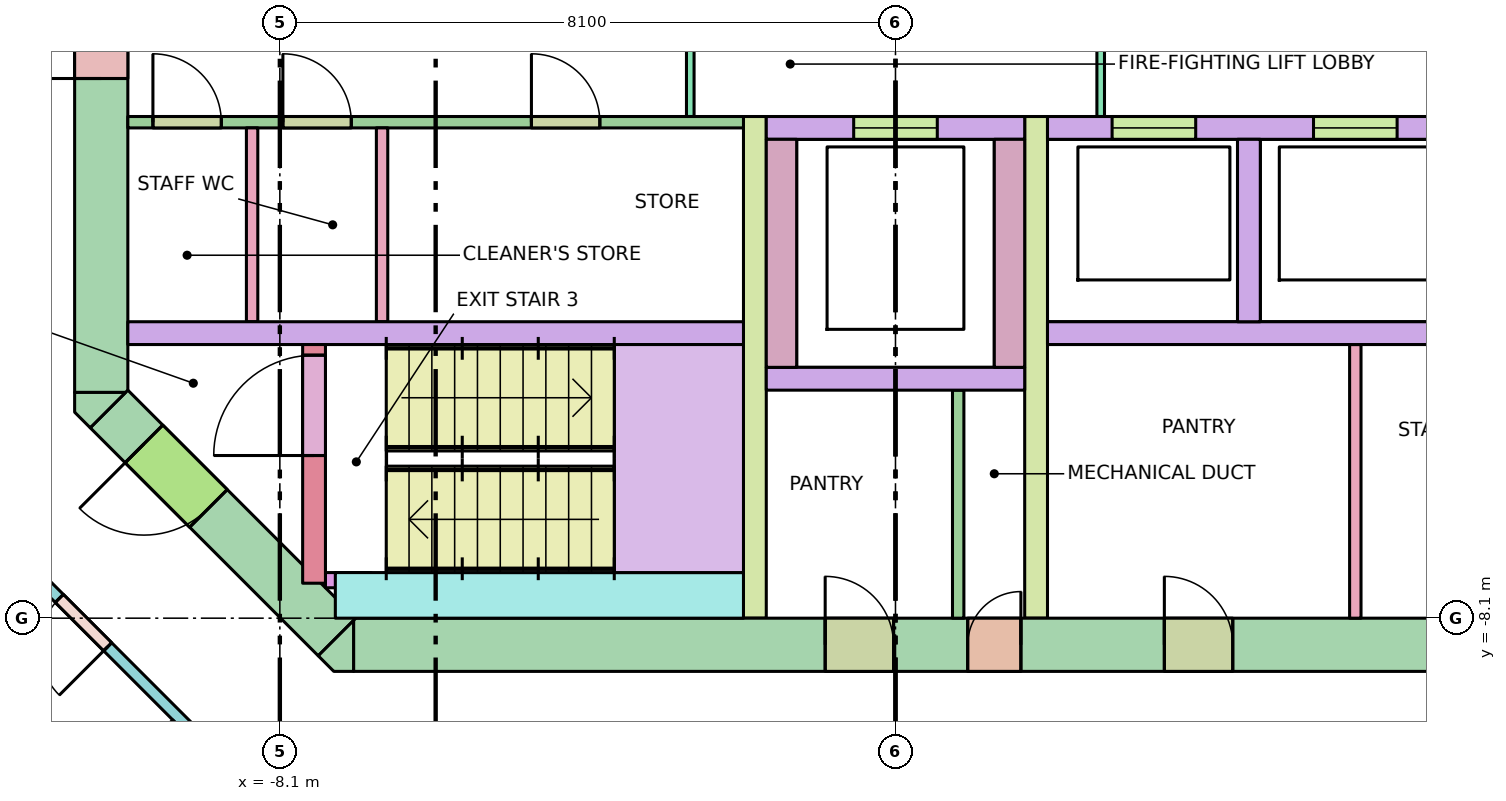
"""IFC4 building model, lengths in metres.
Left out: names, types, materials, properties, quantities, classifications, styles, units other than length and angle.
Written with IfcOpenShell. Run it as: python <this file> out.ifc"""

import sys

from ifc_helpers import new_model, si_unit, direction, frame, frame_2d, origin, place, context, subcontext, project, spatial, polyline, rectangle, outline, extrude, element, fill, save


model = new_model("IFC4")
c1 = context("Model", 3, precision=1e-05, world=origin(), true_north=direction((0.0, 1.0)))
c2 = subcontext(c1, "Body", "Model", "MODEL_VIEW")
j1 = project(units=[si_unit("LENGTHUNIT", "METRE"), si_unit("PLANEANGLEUNIT", "RADIAN")], contexts=[c1])
p1 = place(None, origin())
s1 = spatial("IfcSite", under=j1, at=p1, CompositionType="ELEMENT")
p2 = place(p1, origin())
s2 = spatial("IfcBuilding", under=s1, at=p2, CompositionType="ELEMENT")
p3 = place(p2, frame((0.0, 0.0, 154.2)))
s3 = spatial("IfcBuildingStorey", under=s2, at=p3, CompositionType="ELEMENT", Elevation=154.2)
p4 = place(p3, frame((-7.13, -8.45, -0.28), z_axis=(0.0, 0.0, 1.0), x_axis=(1.0, 0.0, 0.0)))
e1 = element("IfcWall", 1, at=p4, inside=s3, PredefinedType="SHEAR", context=c2, shape_type="SweptSolid", body=[
    extrude(rectangle(XDim=14.26, YDim=0.7, at=frame_2d((7.13, 0.0))), origin(), (0.0, 0.0, 1.0), 3.7),
])
p5 = place(p4, frame((8.08, 0.0, 0.28)))
e2 = element("IfcOpeningElement", 2, at=p5, cuts=e1, PredefinedType="OPENING", context=c2, shape_type="SweptSolid", body=[
    extrude(rectangle(XDim=0.7, YDim=2.1, at=frame_2d((0.35, 1.05))), frame((0.0, 0.36, 0.0), z_axis=(0.0, -1.0, 0.0), x_axis=(1.0, 0.0, 0.0)), (0.0, 0.0, 1.0), 0.72),
])
p6 = place(p4, frame((6.205, 0.0, 0.28)))
e3 = element("IfcOpeningElement", 3, at=p6, cuts=e1, PredefinedType="OPENING", context=c2, shape_type="SweptSolid", body=[
    extrude(rectangle(XDim=0.9, YDim=2.1, at=frame_2d((0.45, 1.05))), frame((0.0, 0.36, 0.0), z_axis=(0.0, -1.0, 0.0), x_axis=(1.0, 0.0, 0.0)), (0.0, 0.0, 1.0), 0.72),
])
p7 = place(p4, frame((10.667, 0.0, 0.28)))
e4 = element("IfcOpeningElement", 4, at=p7, cuts=e1, PredefinedType="OPENING", context=c2, shape_type="SweptSolid", body=[
    extrude(rectangle(XDim=0.9, YDim=2.1, at=frame_2d((0.45, 1.05))), frame((0.0, 0.36, 0.0), z_axis=(0.0, -1.0, 0.0), x_axis=(1.0, 0.0, 0.0)), (0.0, 0.0, 1.0), 0.72),
])
p8 = place(p3, frame((-10.45, -5.13, -0.28), z_axis=(0.0, 0.0, 1.0), x_axis=(0.0, 1.0, 0.0)))
e5 = element("IfcWall", 5, at=p8, inside=s3, PredefinedType="SHEAR", context=c2, shape_type="SweptSolid", body=[
    extrude(rectangle(XDim=10.26, YDim=0.7, at=frame_2d((5.13, 0.0))), origin(), (0.0, 0.0, 1.0), 3.7),
])
p9 = place(p8, frame((4.13, 0.0, 0.28)))
e6 = element("IfcOpeningElement", 6, at=p9, cuts=e5, PredefinedType="OPENING", context=c2, shape_type="SweptSolid", body=[
    extrude(rectangle(XDim=2.0, YDim=2.1, at=frame_2d((1.0, 1.05))), frame((0.0, 0.36, 0.0), z_axis=(0.0, -1.0, 0.0), x_axis=(1.0, 0.0, 0.0)), (0.0, 0.0, 1.0), 0.72),
])
p10 = place(p3, frame((-7.347, -8.347, -0.28), z_axis=(0.0, 0.0, 1.0), x_axis=(-0.707106781187, 0.707106781187, 0.0)))
e7 = element("IfcWall", 7, at=p10, inside=s3, PredefinedType="SHEAR", context=c2, shape_type="SweptSolid", body=[
    extrude(rectangle(XDim=4.243, YDim=0.7, at=frame_2d((2.121, 0.0))), origin(), (0.0, 0.0, 1.0), 3.7),
])
p11 = place(p10, frame((2.393, 0.0, 0.28)))
e8 = element("IfcOpeningElement", 8, at=p11, cuts=e7, PredefinedType="OPENING", context=c2, shape_type="SweptSolid", body=[
    extrude(rectangle(XDim=1.2, YDim=2.1, at=frame_2d((0.6, 1.05))), frame((0.0, 0.36, 0.0), z_axis=(0.0, -1.0, 0.0), x_axis=(1.0, 0.0, 0.0)), (0.0, 0.0, 1.0), 0.72),
])
p12 = place(p3, frame((0.0, 0.0, -0.28)))
e9 = element("IfcWall", 9, at=p12, inside=s3, PredefinedType="SHEAR", context=c2, shape_type="SweptSolid", body=[
    extrude(outline(polyline([(-7.39, -8.8), (-7.595, -8.595), (-7.595, -8.595), (-7.595, -8.595), (-7.13, -8.13), (-7.13, -8.8), (-7.13, -8.8), (-7.39, -8.8)])), origin(), (0.0, 0.0, 1.0), 3.7),
])
p13 = place(p3, frame((0.0, 0.0, -0.28)))
e10 = element("IfcWall", 10, at=p13, inside=s3, PredefinedType="SHEAR", context=c2, shape_type="SweptSolid", body=[
    extrude(outline(polyline([(-10.8, -5.39), (-10.8, -5.13), (-10.8, -5.13), (-10.13, -5.13), (-10.595, -5.595), (-10.595, -5.595), (-10.595, -5.595), (-10.8, -5.39)])), origin(), (0.0, 0.0, 1.0), 3.7),
])
for number, where, z_axis, x_axis in (
    (11, (-10.1, -4.35, 0.0), (0.0, 0.0, 1.0), (1.0, 0.0, 0.0)),
    (12, (2.0, -4.35, 0.0), (0.0, 0.0, 1.0), (1.0, 0.0, 0.0)),
):
    element("IfcWall", number, at=place(p3, frame(where, z_axis=z_axis, x_axis=x_axis)), inside=s3, PredefinedType="SOLIDWALL", context=c2, shape_type="SweptSolid", body=[
        extrude(rectangle(XDim=8.1, YDim=0.3, at=frame_2d((4.05, 0.0))), origin(), (0.0, 0.0, 1.0), 3.42),
    ])
p14 = place(p3, frame((2.0, -1.65, 0.0), z_axis=(0.0, 0.0, 1.0), x_axis=(1.0, 0.0, 0.0)))
e13 = element("IfcWall", 13, at=p14, inside=s3, PredefinedType="SOLIDWALL", context=c2, shape_type="SweptSolid", body=[
    extrude(rectangle(XDim=8.1, YDim=0.3, at=frame_2d((4.05, 0.0))), origin(), (0.0, 0.0, 1.0), 3.42),
])
p15 = place(p14, frame((0.85, 0.0, 0.0)))
e14 = element("IfcOpeningElement", 14, at=p15, cuts=e13, PredefinedType="OPENING", context=c2, shape_type="SweptSolid", body=[
    extrude(rectangle(XDim=1.1, YDim=2.1, at=frame_2d((0.55, 1.05))), frame((0.0, 0.16, 0.0), z_axis=(0.0, -1.0, 0.0), x_axis=(1.0, 0.0, 0.0)), (0.0, 0.0, 1.0), 0.32),
])
p16 = place(p14, frame((3.5, 0.0, 0.0)))
e15 = element("IfcOpeningElement", 15, at=p16, cuts=e13, PredefinedType="OPENING", context=c2, shape_type="SweptSolid", body=[
    extrude(rectangle(XDim=1.1, YDim=2.1, at=frame_2d((0.55, 1.05))), frame((0.0, 0.16, 0.0), z_axis=(0.0, -1.0, 0.0), x_axis=(1.0, 0.0, 0.0)), (0.0, 0.0, 1.0), 0.32),
])
p17 = place(p14, frame((6.3, 0.0, 0.0)))
e16 = element("IfcOpeningElement", 16, at=p17, cuts=e13, PredefinedType="OPENING", context=c2, shape_type="SweptSolid", body=[
    extrude(rectangle(XDim=1.1, YDim=2.1, at=frame_2d((0.55, 1.05))), frame((0.0, 0.16, 0.0), z_axis=(0.0, -1.0, 0.0), x_axis=(1.0, 0.0, 0.0)), (0.0, 0.0, 1.0), 0.32),
])
p18 = place(p3, frame((4.65, -4.2, 0.0), z_axis=(0.0, 0.0, 1.0), x_axis=(0.0, 1.0, 0.0)))
e17 = element("IfcWall", 17, at=p18, inside=s3, PredefinedType="SOLIDWALL", context=c2, shape_type="SweptSolid", body=[
    extrude(rectangle(XDim=2.4, YDim=0.3, at=frame_2d((1.2, 0.0))), origin(), (0.0, 0.0, 1.0), 3.42),
])
for number, where, z_axis, x_axis in (
    (18, (-1.85, -8.1, 0.0), (0.0, 0.0, 1.0), (0.0, 1.0, 0.0)),
    (19, (1.85, -8.1, 0.0), (0.0, 0.0, 1.0), (0.0, 1.0, 0.0)),
):
    element("IfcWall", number, at=place(p3, frame(where, z_axis=z_axis, x_axis=x_axis)), inside=s3, PredefinedType="SHEAR", context=c2, shape_type="SweptSolid", body=[
        extrude(rectangle(XDim=6.6, YDim=0.3, at=frame_2d((3.3, 0.0))), origin(), (0.0, 0.0, 1.0), 3.42),
    ])
p19 = place(p3, frame((-1.7, -1.65, 0.0), z_axis=(0.0, 0.0, 1.0), x_axis=(1.0, 0.0, 0.0)))
e20 = element("IfcWall", 20, at=p19, inside=s3, PredefinedType="SOLIDWALL", context=c2, shape_type="SweptSolid", body=[
    extrude(rectangle(XDim=3.4, YDim=0.3, at=frame_2d((1.7, 0.0))), origin(), (0.0, 0.0, 1.0), 3.42),
])
p20 = place(p19, frame((1.15, 0.0, 0.0)))
e21 = element("IfcOpeningElement", 21, at=p20, cuts=e20, PredefinedType="OPENING", context=c2, shape_type="SweptSolid", body=[
    extrude(rectangle(XDim=1.1, YDim=2.1, at=frame_2d((0.55, 1.05))), frame((0.0, 0.16, 0.0), z_axis=(0.0, -1.0, 0.0), x_axis=(1.0, 0.0, 0.0)), (0.0, 0.0, 1.0), 0.32),
])
for number, where, z_axis, x_axis in (
    (22, (-1.5, -4.8, 0.0), (0.0, 0.0, 1.0), (0.0, 1.0, 0.0)),
    (23, (1.5, -4.8, 0.0), (0.0, 0.0, 1.0), (0.0, 1.0, 0.0)),
):
    element("IfcWall", number, at=place(p3, frame(where, z_axis=z_axis, x_axis=x_axis)), inside=s3, PredefinedType="SOLIDWALL", context=c2, shape_type="SweptSolid", body=[
        extrude(rectangle(XDim=3.0, YDim=0.4, at=frame_2d((1.5, 0.0))), origin(), (0.0, 0.0, 1.0), 3.42),
    ])
p21 = place(p3, frame((-1.7, -4.95, 0.0), z_axis=(0.0, 0.0, 1.0), x_axis=(1.0, 0.0, 0.0)))
e24 = element("IfcWall", 24, at=p21, inside=s3, PredefinedType="SOLIDWALL", context=c2, shape_type="SweptSolid", body=[
    extrude(rectangle(XDim=3.4, YDim=0.3, at=frame_2d((1.7, 0.0))), origin(), (0.0, 0.0, 1.0), 3.42),
])
p22 = place(p3, frame((-7.65, -7.64, 0.0), z_axis=(0.0, 0.0, 1.0), x_axis=(0.0, 1.0, 0.0)))
e25 = element("IfcWall", 25, at=p22, inside=s3, PredefinedType="SHEAR", context=c2, shape_type="SweptSolid", body=[
    extrude(rectangle(XDim=3.14, YDim=0.3, at=frame_2d((1.57, 0.0))), origin(), (0.0, 0.0, 1.0), 3.42),
])
p23 = place(p22, frame((1.68, 0.0, 0.0)))
e26 = element("IfcOpeningElement", 26, at=p23, cuts=e25, PredefinedType="OPENING", context=c2, shape_type="SweptSolid", body=[
    extrude(rectangle(XDim=1.32, YDim=2.1, at=frame_2d((0.66, 1.05))), frame((0.0, 0.16, 0.0), z_axis=(0.0, -1.0, 0.0), x_axis=(1.0, 0.0, 0.0)), (0.0, 0.0, 1.0), 0.32),
])
p24 = place(p3, frame((-7.5, -7.6, 0.0), z_axis=(0.0, 0.0, 1.0), x_axis=(1.0, 0.0, 0.0)))
e27 = element("IfcWall", 27, at=p24, inside=s3, PredefinedType="SHEAR", context=c2, shape_type="SweptSolid", body=[
    extrude(rectangle(XDim=0.6, YDim=0.2, at=frame_2d((0.3, 0.0))), origin(), (0.0, 0.0, 1.0), 3.42),
])
p25 = place(p3, frame((-7.37, -7.8, 0.0), z_axis=(0.0, 0.0, 1.0), x_axis=(1.0, 0.0, 0.0)))
e28 = element("IfcWall", 28, at=p25, inside=s3, PredefinedType="SHEAR", context=c2, shape_type="SweptSolid", body=[
    extrude(rectangle(XDim=5.37, YDim=0.6, at=frame_2d((2.685, 0.0))), origin(), (0.0, 0.0, 1.0), 3.42),
])
p26 = place(p3, frame((-2.7, -1.5, 0.0), z_axis=(0.0, 0.0, 1.0), x_axis=(0.0, 1.0, 0.0)))
e29 = element("IfcWall", 29, at=p26, inside=s3, PredefinedType="PARTITIONING", context=c2, shape_type="SweptSolid", body=[
    extrude(rectangle(XDim=3.0, YDim=0.1, at=frame_2d((1.5, 0.0))), origin(), (0.0, 0.0, 1.0), 3.42),
])
p27 = place(p26, frame((0.9, 0.0, 0.0)))
e30 = element("IfcOpeningElement", 30, at=p27, cuts=e29, PredefinedType="OPENING", context=c2, shape_type="SweptSolid", body=[
    extrude(rectangle(XDim=1.2, YDim=2.1, at=frame_2d((0.6, 1.05))), frame((0.0, 0.06, 0.0), z_axis=(0.0, -1.0, 0.0), x_axis=(1.0, 0.0, 0.0)), (0.0, 0.0, 1.0), 0.12),
])
p28 = place(p3, frame((2.7, -1.5, 0.0), z_axis=(0.0, 0.0, 1.0), x_axis=(0.0, 1.0, 0.0)))
e31 = element("IfcWall", 31, at=p28, inside=s3, PredefinedType="PARTITIONING", context=c2, shape_type="SweptSolid", body=[
    extrude(rectangle(XDim=3.0, YDim=0.1, at=frame_2d((1.5, 0.0))), origin(), (0.0, 0.0, 1.0), 3.42),
])
p29 = place(p28, frame((0.9, 0.0, 0.0)))
e32 = element("IfcOpeningElement", 32, at=p29, cuts=e31, PredefinedType="OPENING", context=c2, shape_type="SweptSolid", body=[
    extrude(rectangle(XDim=1.2, YDim=2.1, at=frame_2d((0.6, 1.05))), frame((0.0, 0.06, 0.0), z_axis=(0.0, -1.0, 0.0), x_axis=(1.0, 0.0, 0.0)), (0.0, 0.0, 1.0), 0.12),
])
p30 = place(p3, frame((0.825, -8.1, 0.0), z_axis=(0.0, 0.0, 1.0), x_axis=(0.0, 1.0, 0.0)))
e33 = element("IfcWall", 33, at=p30, inside=s3, PredefinedType="PARTITIONING", context=c2, shape_type="SweptSolid", body=[
    extrude(rectangle(XDim=3.0, YDim=0.15, at=frame_2d((1.5, 0.0))), origin(), (0.0, 0.0, 1.0), 3.42),
])
p31 = place(p3, frame((6.05, -8.1, 0.0), z_axis=(0.0, 0.0, 1.0), x_axis=(0.0, 1.0, 0.0)))
e34 = element("IfcWall", 34, at=p31, inside=s3, PredefinedType="PARTITIONING", context=c2, shape_type="SweptSolid", body=[
    extrude(rectangle(XDim=3.6, YDim=0.15, at=frame_2d((1.8, 0.0))), origin(), (0.0, 0.0, 1.0), 3.42),
])
for number, where, z_axis, x_axis in (
    (35, (-8.465, -4.2, 0.0), (0.0, 0.0, 1.0), (0.0, 1.0, 0.0)),
    (36, (-6.755, -4.2, 0.0), (0.0, 0.0, 1.0), (0.0, 1.0, 0.0)),
):
    element("IfcWall", number, at=place(p3, frame(where, z_axis=z_axis, x_axis=x_axis)), inside=s3, PredefinedType="PARTITIONING", context=c2, shape_type="SweptSolid", body=[
        extrude(rectangle(XDim=2.55, YDim=0.15, at=frame_2d((1.275, 0.0))), origin(), (0.0, 0.0, 1.0), 3.42),
    ])
p32 = place(p3, frame((-10.1, -1.575, 0.0), z_axis=(0.0, 0.0, 1.0), x_axis=(1.0, 0.0, 0.0)))
e37 = element("IfcWall", 37, at=p32, inside=s3, PredefinedType="PARTITIONING", context=c2, shape_type="SweptSolid", body=[
    extrude(rectangle(XDim=8.1, YDim=0.15, at=frame_2d((4.05, 0.0))), origin(), (0.0, 0.0, 1.0), 3.42),
])
p33 = place(p32, frame((0.33, 0.0, 0.0)))
e38 = element("IfcOpeningElement", 38, at=p33, cuts=e37, PredefinedType="OPENING", context=c2, shape_type="SweptSolid", body=[
    extrude(rectangle(XDim=0.9, YDim=2.1, at=frame_2d((0.45, 1.05))), frame((0.0, 0.085, 0.0), z_axis=(0.0, -1.0, 0.0), x_axis=(1.0, 0.0, 0.0)), (0.0, 0.0, 1.0), 0.17),
])
p34 = place(p32, frame((2.04, 0.0, 0.0)))
e39 = element("IfcOpeningElement", 39, at=p34, cuts=e37, PredefinedType="OPENING", context=c2, shape_type="SweptSolid", body=[
    extrude(rectangle(XDim=0.9, YDim=2.1, at=frame_2d((0.45, 1.05))), frame((0.0, 0.085, 0.0), z_axis=(0.0, -1.0, 0.0), x_axis=(1.0, 0.0, 0.0)), (0.0, 0.0, 1.0), 0.17),
])
p35 = place(p32, frame((5.31, 0.0, 0.0)))
e40 = element("IfcOpeningElement", 40, at=p35, cuts=e37, PredefinedType="OPENING", context=c2, shape_type="SweptSolid", body=[
    extrude(rectangle(XDim=0.9, YDim=2.1, at=frame_2d((0.45, 1.05))), frame((0.0, 0.085, 0.0), z_axis=(0.0, -1.0, 0.0), x_axis=(1.0, 0.0, 0.0)), (0.0, 0.0, 1.0), 0.17),
])
p36 = place(p3, frame((-8.167, -10.675, 0.0), z_axis=(0.0, 0.0, 1.0), x_axis=(-0.707106781187, 0.707106781187, 0.0)))
e41 = element("IfcWall", 41, at=p36, inside=s3, PredefinedType="PARTITIONING", context=c2, shape_type="SweptSolid", body=[
    extrude(rectangle(XDim=6.323, YDim=0.15, at=frame_2d((3.162, 0.0))), origin(), (0.0, 0.0, 1.0), 2.62),
])
p37 = place(p36, frame((3.11, 0.0, 0.0)))
e42 = element("IfcOpeningElement", 42, at=p37, cuts=e41, PredefinedType="OPENING", context=c2, shape_type="SweptSolid", body=[
    extrude(rectangle(XDim=0.9, YDim=2.1, at=frame_2d((0.45, 1.05))), frame((0.0, 0.085, 0.0), z_axis=(0.0, -1.0, 0.0), x_axis=(1.0, 0.0, 0.0)), (0.0, 0.0, 1.0), 0.17),
])
p38 = place(p36, frame((0.462, 0.0, 0.0)))
e43 = element("IfcOpeningElement", 43, at=p38, cuts=e41, PredefinedType="OPENING", context=c2, shape_type="SweptSolid", body=[
    extrude(rectangle(XDim=0.9, YDim=2.1, at=frame_2d((0.45, 1.05))), frame((0.0, 0.085, 0.0), z_axis=(0.0, -1.0, 0.0), x_axis=(1.0, 0.0, 0.0)), (0.0, 0.0, 1.0), 0.17),
])
p39 = place(p3, frame((-9.474, -9.474, 0.0), z_axis=(0.0, 0.0, 1.0), x_axis=(-0.707106781187, -0.707106781187, 0.0)))
e44 = element("IfcWall", 44, at=p39, inside=s3, PredefinedType="PARTITIONING", context=c2, shape_type="SweptSolid", body=[
    extrude(rectangle(XDim=5.439, YDim=0.1, at=frame_2d((2.719, 0.0))), origin(), (0.0, 0.0, 1.0), 2.62),
])
p40 = place(p15, origin())
e45 = element("IfcDoor", 45, at=p40, inside=s3, OperationType="DOUBLE_DOOR_SLIDING", PredefinedType="DOOR", context=c2, shape_type="SweptSolid", body=[
    extrude(rectangle(XDim=1.1, YDim=2.1, at=frame_2d((0.55, 1.05))), frame((0.0, 0.025, 0.0), z_axis=(0.0, -1.0, 0.0), x_axis=(1.0, 0.0, 0.0)), (0.0, 0.0, 1.0), 0.05),
])
fill(e14, e45)
p41 = place(p16, origin())
e46 = element("IfcDoor", 46, at=p41, inside=s3, OperationType="DOUBLE_DOOR_SLIDING", PredefinedType="DOOR", context=c2, shape_type="SweptSolid", body=[
    extrude(rectangle(XDim=1.1, YDim=2.1, at=frame_2d((0.55, 1.05))), frame((0.0, 0.025, 0.0), z_axis=(0.0, -1.0, 0.0), x_axis=(1.0, 0.0, 0.0)), (0.0, 0.0, 1.0), 0.05),
])
fill(e15, e46)
p42 = place(p20, origin())
e47 = element("IfcDoor", 47, at=p42, inside=s3, OperationType="DOUBLE_DOOR_SLIDING", PredefinedType="DOOR", context=c2, shape_type="SweptSolid", body=[
    extrude(rectangle(XDim=1.1, YDim=2.1, at=frame_2d((0.55, 1.05))), frame((0.0, 0.025, 0.0), z_axis=(0.0, -1.0, 0.0), x_axis=(1.0, 0.0, 0.0)), (0.0, 0.0, 1.0), 0.05),
])
fill(e21, e47)
p43 = place(p23, origin())
e48 = element("IfcDoor", 48, at=p43, inside=s3, OperationType="DOUBLE_DOOR_SINGLE_SWING", PredefinedType="DOOR", context=c2, shape_type="SweptSolid", body=[
    extrude(rectangle(XDim=1.32, YDim=2.1, at=frame_2d((0.66, 1.05))), frame((0.0, 0.025, 0.0), z_axis=(0.0, -1.0, 0.0), x_axis=(1.0, 0.0, 0.0)), (0.0, 0.0, 1.0), 0.05),
])
fill(e26, e48)
p44 = place(p11, origin())
e49 = element("IfcDoor", 49, at=p44, inside=s3, OperationType="SINGLE_SWING_RIGHT", PredefinedType="DOOR", context=c2, shape_type="SweptSolid", body=[
    extrude(rectangle(XDim=1.2, YDim=2.1, at=frame_2d((0.6, 1.05))), frame((0.0, 0.025, 0.0), z_axis=(0.0, -1.0, 0.0), x_axis=(1.0, 0.0, 0.0)), (0.0, 0.0, 1.0), 0.05),
])
fill(e8, e49)
p45 = place(p9, origin())
e50 = element("IfcDoor", 50, at=p45, inside=s3, OperationType="DOUBLE_DOOR_SINGLE_SWING", PredefinedType="DOOR", context=c2, shape_type="SweptSolid", body=[
    extrude(rectangle(XDim=2.0, YDim=2.1, at=frame_2d((1.0, 1.05))), frame((0.0, 0.025, 0.0), z_axis=(0.0, -1.0, 0.0), x_axis=(1.0, 0.0, 0.0)), (0.0, 0.0, 1.0), 0.05),
])
fill(e6, e50)
p46 = place(p5, origin())
e51 = element("IfcDoor", 51, at=p46, inside=s3, OperationType="SINGLE_SWING_RIGHT", PredefinedType="DOOR", context=c2, shape_type="SweptSolid", body=[
    extrude(rectangle(XDim=0.7, YDim=2.1, at=frame_2d((0.35, 1.05))), frame((0.0, 0.025, 0.0), z_axis=(0.0, -1.0, 0.0), x_axis=(1.0, 0.0, 0.0)), (0.0, 0.0, 1.0), 0.05),
])
fill(e2, e51)
p47 = place(p6, origin())
e52 = element("IfcDoor", 52, at=p47, inside=s3, OperationType="SINGLE_SWING_LEFT", PredefinedType="DOOR", context=c2, shape_type="SweptSolid", body=[
    extrude(rectangle(XDim=0.9, YDim=2.1, at=frame_2d((0.45, 1.05))), frame((0.0, 0.025, 0.0), z_axis=(0.0, -1.0, 0.0), x_axis=(1.0, 0.0, 0.0)), (0.0, 0.0, 1.0), 0.05),
])
fill(e3, e52)
p48 = place(p7, origin())
e53 = element("IfcDoor", 53, at=p48, inside=s3, OperationType="SINGLE_SWING_LEFT", PredefinedType="DOOR", context=c2, shape_type="SweptSolid", body=[
    extrude(rectangle(XDim=0.9, YDim=2.1, at=frame_2d((0.45, 1.05))), frame((0.0, 0.025, 0.0), z_axis=(0.0, -1.0, 0.0), x_axis=(1.0, 0.0, 0.0)), (0.0, 0.0, 1.0), 0.05),
])
fill(e4, e53)
p49 = place(p33, origin())
e54 = element("IfcDoor", 54, at=p49, inside=s3, OperationType="SINGLE_SWING_LEFT", PredefinedType="DOOR", context=c2, shape_type="SweptSolid", body=[
    extrude(rectangle(XDim=0.9, YDim=2.1, at=frame_2d((0.45, 1.05))), frame((0.0, 0.025, 0.0), z_axis=(0.0, -1.0, 0.0), x_axis=(1.0, 0.0, 0.0)), (0.0, 0.0, 1.0), 0.05),
])
fill(e38, e54)
p50 = place(p34, origin())
e55 = element("IfcDoor", 55, at=p50, inside=s3, OperationType="SINGLE_SWING_LEFT", PredefinedType="DOOR", context=c2, shape_type="SweptSolid", body=[
    extrude(rectangle(XDim=0.9, YDim=2.1, at=frame_2d((0.45, 1.05))), frame((0.0, 0.025, 0.0), z_axis=(0.0, -1.0, 0.0), x_axis=(1.0, 0.0, 0.0)), (0.0, 0.0, 1.0), 0.05),
])
fill(e39, e55)
p51 = place(p35, origin())
e56 = element("IfcDoor", 56, at=p51, inside=s3, OperationType="SINGLE_SWING_LEFT", PredefinedType="DOOR", context=c2, shape_type="SweptSolid", body=[
    extrude(rectangle(XDim=0.9, YDim=2.1, at=frame_2d((0.45, 1.05))), frame((0.0, 0.025, 0.0), z_axis=(0.0, -1.0, 0.0), x_axis=(1.0, 0.0, 0.0)), (0.0, 0.0, 1.0), 0.05),
])
fill(e40, e56)
p52 = place(p37, origin())
e57 = element("IfcDoor", 57, at=p52, inside=s3, OperationType="SINGLE_SWING_LEFT", PredefinedType="DOOR", context=c2, shape_type="SweptSolid", body=[
    extrude(rectangle(XDim=0.9, YDim=2.1, at=frame_2d((0.45, 1.05))), frame((0.0, 0.025, 0.0), z_axis=(0.0, -1.0, 0.0), x_axis=(1.0, 0.0, 0.0)), (0.0, 0.0, 1.0), 0.05),
])
fill(e42, e57)
save(model, sys.argv[1])
